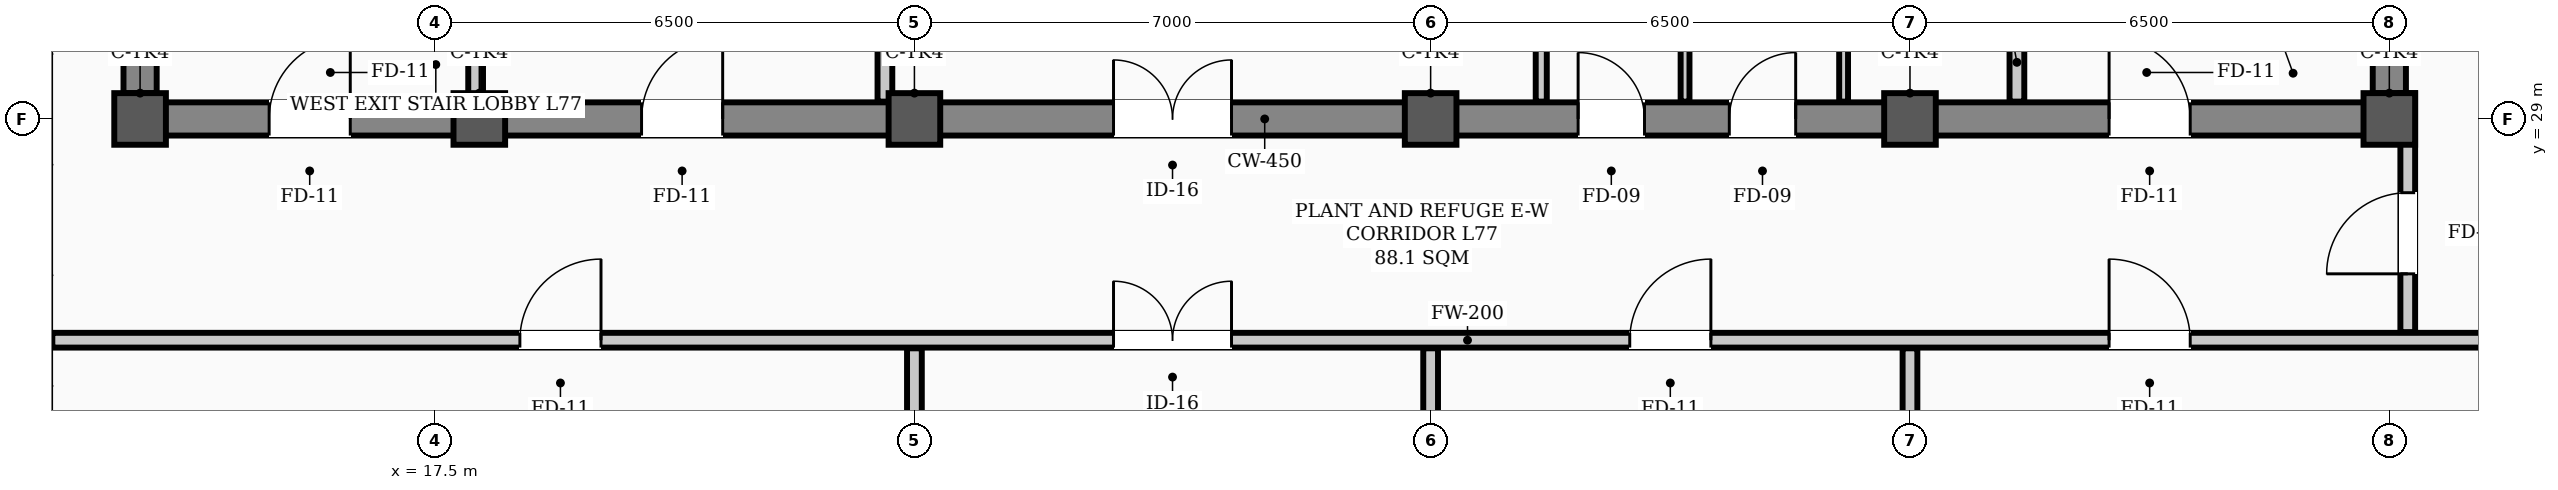
"""IFC4 building model, lengths in metres.
Left out: names, types, materials, properties, quantities, classifications, styles, units other than length and angle.
Written with IfcOpenShell. Run it as: python <this file> out.ifc"""

import sys

from ifc_helpers import new_model, si_unit, direction, frame, frame_2d, origin, origin_2d, place, context, subcontext, project, spatial, rectangle, hollow_rectangle, extrude, element, fill, save


model = new_model("IFC4")
c1 = context("Model", 3, precision=1e-05, world=origin(), true_north=direction((0.0, 1.0)))
c2 = subcontext(c1, "Body", "Model", "MODEL_VIEW")
j1 = project(units=[si_unit("LENGTHUNIT", "METRE"), si_unit("PLANEANGLEUNIT", "RADIAN")], contexts=[c1])
p1 = place(None, origin())
s1 = spatial("IfcSite", under=j1, at=p1, CompositionType="ELEMENT")
p2 = place(p1, origin())
s2 = spatial("IfcBuilding", under=s1, at=p2, CompositionType="ELEMENT")
p3 = place(p2, frame((0.0, 0.0, 312.6)))
s3 = spatial("IfcBuildingStorey", under=s2, at=p3, CompositionType="ELEMENT", Elevation=312.6)
for number, where, z_axis, x_axis in (
    (1, (13.5, 29.0, 0.0), (0.0, 0.0, 1.0), (1.0, 0.0, 0.0)),
    (2, (18.1, 29.0, 0.0), (0.0, 0.0, 1.0), (1.0, 0.0, 0.0)),
    (3, (24.0, 29.0, 0.0), (0.0, 0.0, 1.0), (1.0, 0.0, 0.0)),
    (4, (31.0, 29.0, 0.0), (0.0, 0.0, 1.0), (1.0, 0.0, 0.0)),
    (5, (37.5, 29.0, 0.0), (0.0, 0.0, 1.0), (1.0, 0.0, 0.0)),
    (6, (44.0, 29.0, 0.0), (0.0, 0.0, 1.0), (1.0, 0.0, 0.0)),
):
    element("IfcColumn", number, at=place(p3, frame(where, z_axis=z_axis, x_axis=x_axis)), inside=s3, PredefinedType="COLUMN", context=c2, shape_type="SweptSolid", body=[
        extrude(hollow_rectangle(XDim=0.7, YDim=0.7, WallThickness=0.028, InnerFilletRadius=0.014, OuterFilletRadius=0.042, at=origin_2d()), origin(), (0.0, 0.0, 1.0), 4.8),
    ])
p4 = place(p3, frame((13.5, 29.0, 0.0), z_axis=(0.0, 0.0, 1.0), x_axis=(1.0, 0.0, 0.0)))
e7 = element("IfcWall", 7, at=p4, inside=s3, PredefinedType="SHEAR", context=c2, shape_type="SweptSolid", body=[
    extrude(rectangle(XDim=30.5, YDim=0.45, at=frame_2d((15.25, 0.0))), origin(), (0.0, 0.0, 1.0), 4.45),
])
p5 = place(p4, frame((1.75, 0.0, 0.0)))
e8 = element("IfcOpeningElement", 8, at=p5, cuts=e7, PredefinedType="OPENING", context=c2, shape_type="SweptSolid", body=[
    extrude(rectangle(XDim=1.1, YDim=2.08, at=frame_2d((0.55, 1.04))), frame((0.0, 0.235, 0.0), z_axis=(0.0, -1.0, 0.0), x_axis=(1.0, 0.0, 0.0)), (0.0, 0.0, 1.0), 0.47),
])
p6 = place(p4, frame((26.7, 0.0, 0.0)))
e9 = element("IfcOpeningElement", 9, at=p6, cuts=e7, PredefinedType="OPENING", context=c2, shape_type="SweptSolid", body=[
    extrude(rectangle(XDim=1.1, YDim=2.08, at=frame_2d((0.55, 1.04))), frame((0.0, 0.235, 0.0), z_axis=(0.0, -1.0, 0.0), x_axis=(1.0, 0.0, 0.0)), (0.0, 0.0, 1.0), 0.47),
])
p7 = place(p4, frame((6.8, 0.0, 0.0)))
e10 = element("IfcOpeningElement", 10, at=p7, cuts=e7, PredefinedType="OPENING", context=c2, shape_type="SweptSolid", body=[
    extrude(rectangle(XDim=1.1, YDim=2.08, at=frame_2d((0.55, 1.04))), frame((0.0, 0.235, 0.0), z_axis=(0.0, -1.0, 0.0), x_axis=(1.0, 0.0, 0.0)), (0.0, 0.0, 1.0), 0.47),
])
p8 = place(p4, frame((13.2, 0.0, 0.0)))
e11 = element("IfcOpeningElement", 11, at=p8, cuts=e7, PredefinedType="OPENING", context=c2, shape_type="SweptSolid", body=[
    extrude(rectangle(XDim=1.6, YDim=2.08, at=frame_2d((0.8, 1.04))), frame((0.0, 0.235, 0.0), z_axis=(0.0, -1.0, 0.0), x_axis=(1.0, 0.0, 0.0)), (0.0, 0.0, 1.0), 0.47),
])
p9 = place(p4, frame((19.5, 0.0, 0.0)))
e12 = element("IfcOpeningElement", 12, at=p9, cuts=e7, PredefinedType="OPENING", context=c2, shape_type="SweptSolid", body=[
    extrude(rectangle(XDim=0.9, YDim=2.08, at=frame_2d((0.45, 1.04))), frame((0.0, 0.235, 0.0), z_axis=(0.0, -1.0, 0.0), x_axis=(1.0, 0.0, 0.0)), (0.0, 0.0, 1.0), 0.47),
])
p10 = place(p4, frame((21.55, 0.0, 0.0)))
e13 = element("IfcOpeningElement", 13, at=p10, cuts=e7, PredefinedType="OPENING", context=c2, shape_type="SweptSolid", body=[
    extrude(rectangle(XDim=0.9, YDim=2.08, at=frame_2d((0.45, 1.04))), frame((0.0, 0.235, 0.0), z_axis=(0.0, -1.0, 0.0), x_axis=(1.0, 0.0, 0.0)), (0.0, 0.0, 1.0), 0.47),
])
for number, where, z_axis, x_axis in (
    (14, (13.5, 29.35, 0.0), (0.0, 0.0, 1.0), (0.0, 1.0, 0.0)),
    (15, (44.0, 29.35, 0.0), (0.0, 0.0, 1.0), (0.0, 1.0, 0.0)),
):
    element("IfcWall", number, at=place(p3, frame(where, z_axis=z_axis, x_axis=x_axis)), inside=s3, PredefinedType="SHEAR", context=c2, shape_type="SweptSolid", body=[
        extrude(rectangle(XDim=8.6, YDim=0.45, at=frame_2d((4.3, 0.0))), origin(), (0.0, 0.0, 1.0), 4.45),
    ])
p11 = place(p3, frame((12.31, 26.0, 0.0), z_axis=(0.0, 0.0, 1.0), x_axis=(1.0, 0.0, 0.0)))
e16 = element("IfcWall", 16, at=p11, inside=s3, PredefinedType="STANDARD", context=c2, shape_type="SweptSolid", body=[
    extrude(rectangle(XDim=38.38, YDim=0.2, at=frame_2d((19.19, 0.0))), origin(), (0.0, 0.0, 1.0), 4.396),
])
p12 = place(p11, frame((6.34, 0.0, 0.0)))
e17 = element("IfcOpeningElement", 17, at=p12, cuts=e16, PredefinedType="OPENING", context=c2, shape_type="SweptSolid", body=[
    extrude(rectangle(XDim=1.1, YDim=2.08, at=frame_2d((0.55, 1.04))), frame((0.0, 0.11, 0.0), z_axis=(0.0, -1.0, 0.0), x_axis=(1.0, 0.0, 0.0)), (0.0, 0.0, 1.0), 0.22),
])
p13 = place(p11, frame((14.39, 0.0, 0.0)))
e18 = element("IfcOpeningElement", 18, at=p13, cuts=e16, PredefinedType="OPENING", context=c2, shape_type="SweptSolid", body=[
    extrude(rectangle(XDim=1.6, YDim=2.08, at=frame_2d((0.8, 1.04))), frame((0.0, 0.11, 0.0), z_axis=(0.0, -1.0, 0.0), x_axis=(1.0, 0.0, 0.0)), (0.0, 0.0, 1.0), 0.22),
])
p14 = place(p11, frame((21.39, 0.0, 0.0)))
e19 = element("IfcOpeningElement", 19, at=p14, cuts=e16, PredefinedType="OPENING", context=c2, shape_type="SweptSolid", body=[
    extrude(rectangle(XDim=1.1, YDim=2.08, at=frame_2d((0.55, 1.04))), frame((0.0, 0.11, 0.0), z_axis=(0.0, -1.0, 0.0), x_axis=(1.0, 0.0, 0.0)), (0.0, 0.0, 1.0), 0.22),
])
p15 = place(p11, frame((27.89, 0.0, 0.0)))
e20 = element("IfcOpeningElement", 20, at=p15, cuts=e16, PredefinedType="OPENING", context=c2, shape_type="SweptSolid", body=[
    extrude(rectangle(XDim=1.1, YDim=2.08, at=frame_2d((0.55, 1.04))), frame((0.0, 0.11, 0.0), z_axis=(0.0, -1.0, 0.0), x_axis=(1.0, 0.0, 0.0)), (0.0, 0.0, 1.0), 0.22),
])
for number, where, z_axis, x_axis in (
    (21, (18.05, 29.235, 0.0), (0.0, 0.0, 1.0), (0.0, 1.0, 0.0)),
    (22, (38.95, 29.235, 0.0), (0.0, 0.0, 1.0), (0.0, 1.0, 0.0)),
):
    element("IfcWall", number, at=place(p3, frame(where, z_axis=z_axis, x_axis=x_axis)), inside=s3, PredefinedType="STANDARD", context=c2, shape_type="SweptSolid", body=[
        extrude(rectangle(XDim=1.065, YDim=0.2, at=frame_2d((0.532, 0.0))), origin(), (0.0, 0.0, 1.0), 4.45),
    ])
p16 = place(p3, frame((23.6, 29.235, 0.0), z_axis=(0.0, 0.0, 1.0), x_axis=(0.0, 1.0, 0.0)))
e23 = element("IfcWall", 23, at=p16, inside=s3, PredefinedType="STANDARD", context=c2, shape_type="SweptSolid", body=[
    extrude(rectangle(XDim=5.465, YDim=0.2, at=frame_2d((2.732, 0.0))), origin(), (0.0, 0.0, 1.0), 4.396),
])
p17 = place(p3, frame((32.5, 29.235, 0.0), z_axis=(0.0, 0.0, 1.0), x_axis=(0.0, 1.0, 0.0)))
e24 = element("IfcWall", 24, at=p17, inside=s3, PredefinedType="PARTITIONING", context=c2, shape_type="SweptSolid", body=[
    extrude(rectangle(XDim=2.53, YDim=0.15, at=frame_2d((1.265, 0.0))), origin(), (0.0, 0.0, 1.0), 4.45),
])
for number, where, z_axis, x_axis in (
    (25, (36.6, 29.235, 0.0), (0.0, 0.0, 1.0), (0.0, 1.0, 0.0)),
    (26, (34.45, 29.235, 0.0), (0.0, 0.0, 1.0), (0.0, 1.0, 0.0)),
):
    element("IfcWall", number, at=place(p3, frame(where, z_axis=z_axis, x_axis=x_axis)), inside=s3, PredefinedType="PARTITIONING", context=c2, shape_type="SweptSolid", body=[
        extrude(rectangle(XDim=2.53, YDim=0.12, at=frame_2d((1.265, 0.0))), origin(), (0.0, 0.0, 1.0), 4.45),
    ])
p18 = place(p3, frame((44.25, 26.11, 0.0), z_axis=(0.0, 0.0, 1.0), x_axis=(0.0, 1.0, 0.0)))
e27 = element("IfcWall", 27, at=p18, inside=s3, PredefinedType="STANDARD", context=c2, shape_type="SweptSolid", body=[
    extrude(rectangle(XDim=3.24, YDim=0.2, at=frame_2d((1.62, 0.0))), origin(), (0.0, 0.0, 1.0), 4.396),
])
p19 = place(p18, frame((0.79, 0.0, 0.0)))
e28 = element("IfcOpeningElement", 28, at=p19, cuts=e27, PredefinedType="OPENING", context=c2, shape_type="SweptSolid", body=[
    extrude(rectangle(XDim=1.1, YDim=2.08, at=frame_2d((0.55, 1.04))), frame((0.0, 0.11, 0.0), z_axis=(0.0, -1.0, 0.0), x_axis=(1.0, 0.0, 0.0)), (0.0, 0.0, 1.0), 0.22),
])
for number, where, z_axis, x_axis in (
    (29, (24.0, 18.71, 0.0), (0.0, 0.0, 1.0), (0.0, 1.0, 0.0)),
    (30, (31.0, 18.71, 0.0), (0.0, 0.0, 1.0), (0.0, 1.0, 0.0)),
    (31, (37.5, 18.71, 0.0), (0.0, 0.0, 1.0), (0.0, 1.0, 0.0)),
):
    element("IfcWall", number, at=place(p3, frame(where, z_axis=z_axis, x_axis=x_axis)), inside=s3, PredefinedType="STANDARD", context=c2, shape_type="SweptSolid", body=[
        extrude(rectangle(XDim=7.18, YDim=0.2, at=frame_2d((3.59, 0.0))), origin(), (0.0, 0.0, 1.0), 4.396),
    ])
p20 = place(p5, origin())
e32 = element("IfcDoor", 32, at=p20, inside=s3, OperationType="SINGLE_SWING_RIGHT", PredefinedType="DOOR", context=c2, shape_type="SweptSolid", body=[
    extrude(rectangle(XDim=1.1, YDim=2.08, at=frame_2d((0.55, 1.04))), frame((0.0, 0.025, 0.0), z_axis=(0.0, -1.0, 0.0), x_axis=(1.0, 0.0, 0.0)), (0.0, 0.0, 1.0), 0.05),
])
fill(e8, e32)
p21 = place(p6, origin())
e33 = element("IfcDoor", 33, at=p21, inside=s3, OperationType="SINGLE_SWING_LEFT", PredefinedType="DOOR", context=c2, shape_type="SweptSolid", body=[
    extrude(rectangle(XDim=1.1, YDim=2.08, at=frame_2d((0.55, 1.04))), frame((0.0, 0.025, 0.0), z_axis=(0.0, -1.0, 0.0), x_axis=(1.0, 0.0, 0.0)), (0.0, 0.0, 1.0), 0.05),
])
fill(e9, e33)
p22 = place(p7, origin())
e34 = element("IfcDoor", 34, at=p22, inside=s3, OperationType="SINGLE_SWING_RIGHT", PredefinedType="DOOR", context=c2, shape_type="SweptSolid", body=[
    extrude(rectangle(XDim=1.1, YDim=2.08, at=frame_2d((0.55, 1.04))), frame((0.0, 0.025, 0.0), z_axis=(0.0, -1.0, 0.0), x_axis=(1.0, 0.0, 0.0)), (0.0, 0.0, 1.0), 0.05),
])
fill(e10, e34)
p23 = place(p8, origin())
e35 = element("IfcDoor", 35, at=p23, inside=s3, OperationType="DOUBLE_DOOR_SINGLE_SWING", PredefinedType="DOOR", context=c2, shape_type="SweptSolid", body=[
    extrude(rectangle(XDim=1.6, YDim=2.08, at=frame_2d((0.8, 1.04))), frame((0.0, 0.025, 0.0), z_axis=(0.0, -1.0, 0.0), x_axis=(1.0, 0.0, 0.0)), (0.0, 0.0, 1.0), 0.05),
])
fill(e11, e35)
p24 = place(p9, origin())
e36 = element("IfcDoor", 36, at=p24, inside=s3, OperationType="SINGLE_SWING_LEFT", PredefinedType="DOOR", context=c2, shape_type="SweptSolid", body=[
    extrude(rectangle(XDim=0.9, YDim=2.08, at=frame_2d((0.45, 1.04))), frame((0.0, 0.025, 0.0), z_axis=(0.0, -1.0, 0.0), x_axis=(1.0, 0.0, 0.0)), (0.0, 0.0, 1.0), 0.05),
])
fill(e12, e36)
p25 = place(p10, origin())
e37 = element("IfcDoor", 37, at=p25, inside=s3, OperationType="SINGLE_SWING_RIGHT", PredefinedType="DOOR", context=c2, shape_type="SweptSolid", body=[
    extrude(rectangle(XDim=0.9, YDim=2.08, at=frame_2d((0.45, 1.04))), frame((0.0, 0.025, 0.0), z_axis=(0.0, -1.0, 0.0), x_axis=(1.0, 0.0, 0.0)), (0.0, 0.0, 1.0), 0.05),
])
fill(e13, e37)
p26 = place(p19, origin())
e38 = element("IfcDoor", 38, at=p26, inside=s3, OperationType="SINGLE_SWING_LEFT", PredefinedType="DOOR", context=c2, shape_type="SweptSolid", body=[
    extrude(rectangle(XDim=1.1, YDim=2.08, at=frame_2d((0.55, 1.04))), frame((0.0, 0.025, 0.0), z_axis=(0.0, -1.0, 0.0), x_axis=(1.0, 0.0, 0.0)), (0.0, 0.0, 1.0), 0.05),
])
fill(e28, e38)
p27 = place(p12, origin())
e39 = element("IfcDoor", 39, at=p27, inside=s3, OperationType="SINGLE_SWING_RIGHT", PredefinedType="DOOR", context=c2, shape_type="SweptSolid", body=[
    extrude(rectangle(XDim=1.1, YDim=2.08, at=frame_2d((0.55, 1.04))), frame((0.0, 0.025, 0.0), z_axis=(0.0, -1.0, 0.0), x_axis=(1.0, 0.0, 0.0)), (0.0, 0.0, 1.0), 0.05),
])
fill(e17, e39)
p28 = place(p13, origin())
e40 = element("IfcDoor", 40, at=p28, inside=s3, OperationType="DOUBLE_DOOR_SINGLE_SWING", PredefinedType="DOOR", context=c2, shape_type="SweptSolid", body=[
    extrude(rectangle(XDim=1.6, YDim=2.08, at=frame_2d((0.8, 1.04))), frame((0.0, 0.025, 0.0), z_axis=(0.0, -1.0, 0.0), x_axis=(1.0, 0.0, 0.0)), (0.0, 0.0, 1.0), 0.05),
])
fill(e18, e40)
p29 = place(p14, origin())
e41 = element("IfcDoor", 41, at=p29, inside=s3, OperationType="SINGLE_SWING_RIGHT", PredefinedType="DOOR", context=c2, shape_type="SweptSolid", body=[
    extrude(rectangle(XDim=1.1, YDim=2.08, at=frame_2d((0.55, 1.04))), frame((0.0, 0.025, 0.0), z_axis=(0.0, -1.0, 0.0), x_axis=(1.0, 0.0, 0.0)), (0.0, 0.0, 1.0), 0.05),
])
fill(e19, e41)
p30 = place(p15, origin())
e42 = element("IfcDoor", 42, at=p30, inside=s3, OperationType="SINGLE_SWING_LEFT", PredefinedType="DOOR", context=c2, shape_type="SweptSolid", body=[
    extrude(rectangle(XDim=1.1, YDim=2.08, at=frame_2d((0.55, 1.04))), frame((0.0, 0.025, 0.0), z_axis=(0.0, -1.0, 0.0), x_axis=(1.0, 0.0, 0.0)), (0.0, 0.0, 1.0), 0.05),
])
fill(e20, e42)
save(model, sys.argv[1])
